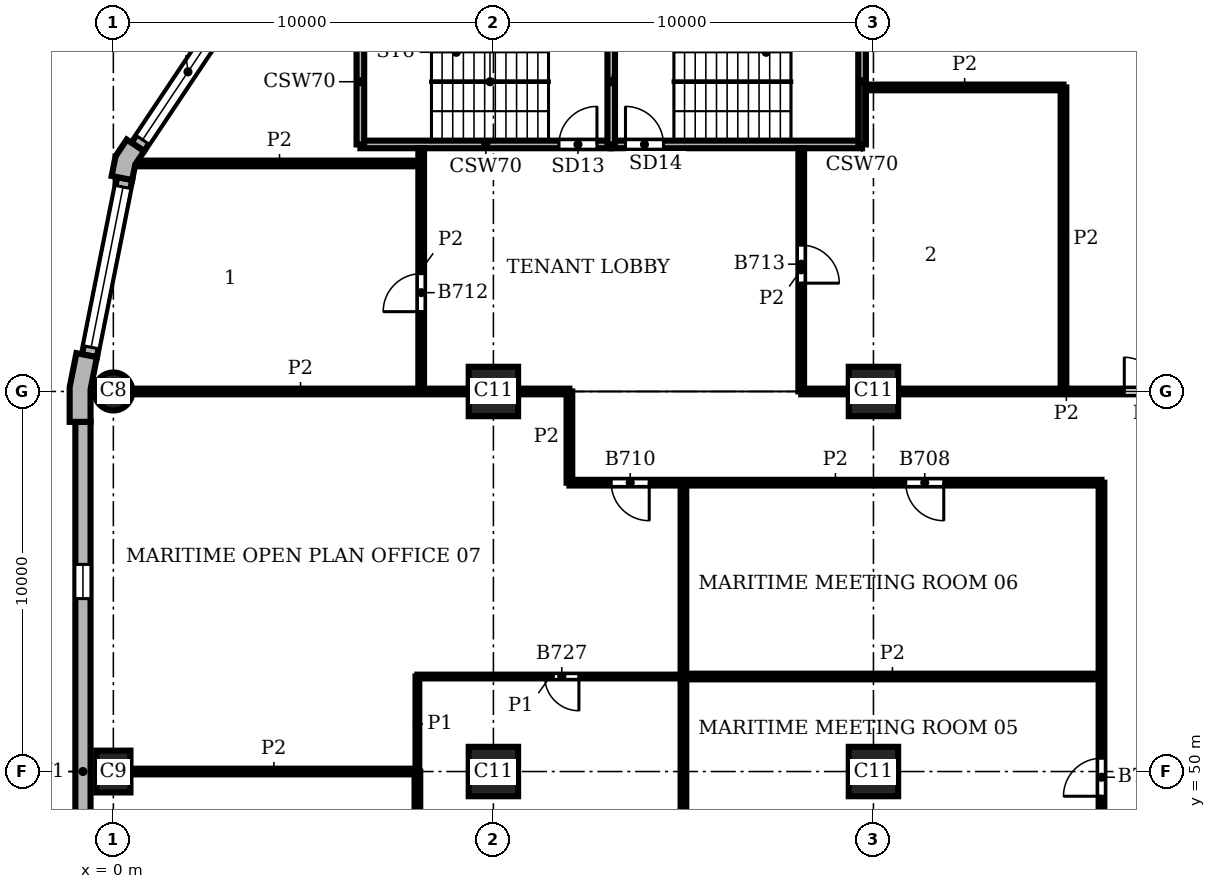
"""IFC4 building model, lengths in metres.
Left out: names, types, materials, properties, quantities, classifications, styles, units other than length and angle.
Written with IfcOpenShell. Run it as: python <this file> out.ifc"""

import sys

from ifc_helpers import new_model, si_unit, direction, frame, frame_2d, origin, origin_2d, place, context, subcontext, project, spatial, polyline, rectangle, circle, outline, extrude, element, fill, save


model = new_model("IFC4")
c1 = context("Model", 3, precision=1e-05, world=origin(), true_north=direction((0.0, 1.0)))
c2 = subcontext(c1, "Body", "Model", "MODEL_VIEW")
j1 = project(units=[si_unit("LENGTHUNIT", "METRE"), si_unit("PLANEANGLEUNIT", "RADIAN")], contexts=[c1])
p1 = place(None, origin())
s1 = spatial("IfcSite", under=j1, at=p1, CompositionType="ELEMENT")
p2 = place(p1, origin())
s2 = spatial("IfcBuilding", under=s1, at=p2, CompositionType="ELEMENT")
p3 = place(p2, frame((0.0, 0.0, 209.7)))
s3 = spatial("IfcBuildingStorey", under=s2, at=p3, CompositionType="ELEMENT", Elevation=209.7)
p4 = place(p3, frame((0.0, 60.0, 0.0), z_axis=(0.0, 0.0, 1.0), x_axis=(1.0, 0.0, 0.0)))
e1 = element("IfcColumn", 1, at=p4, inside=s3, PredefinedType="COLUMN", context=c2, shape_type="SweptSolid", body=[
    extrude(circle(Radius=0.5, at=origin_2d()), origin(), (0.0, 0.0, 1.0), 3.9),
])
p5 = place(p3, frame((0.0, 50.0, 0.0), z_axis=(0.0, 0.0, 1.0), x_axis=(0.0, 1.0, 0.0)))
e2 = element("IfcColumn", 2, at=p5, inside=s3, PredefinedType="COLUMN", context=c2, shape_type="SweptSolid", body=[
    extrude(rectangle(XDim=1.1, YDim=0.9, at=origin_2d()), origin(), (0.0, 0.0, 1.0), 3.9),
])
for number, where, z_axis, x_axis in (
    (3, (10.0, 50.0, 0.0), (0.0, 0.0, 1.0), (1.0, 0.0, 0.0)),
    (4, (10.0, 60.0, 0.0), (0.0, 0.0, 1.0), (1.0, 0.0, 0.0)),
    (5, (20.0, 50.0, 0.0), (0.0, 0.0, 1.0), (1.0, 0.0, 0.0)),
    (6, (20.0, 60.0, 0.0), (0.0, 0.0, 1.0), (1.0, 0.0, 0.0)),
):
    element("IfcColumn", number, at=place(p3, frame(where, z_axis=z_axis, x_axis=x_axis)), inside=s3, PredefinedType="COLUMN", context=c2, shape_type="SweptSolid", body=[
        extrude(rectangle(XDim=1.3, YDim=1.3, at=origin_2d()), origin(), (0.0, 0.0, 1.0), 3.9),
    ])
p6 = place(p3, origin())
e7 = element("IfcWall", 7, at=p6, inside=s3, PredefinedType="SOLIDWALL", context=c2, shape_type="SweptSolid", body=[
    extrude(outline(polyline([(0.477, 66.545), (0.352, 66.629), (0.059, 66.189), (-0.045, 65.67), (0.103, 65.641), (0.495, 65.563), (0.577, 65.974), (0.81, 66.323), (0.477, 66.545)])), origin(), (0.0, 0.0, 1.0), 3.9),
])
e8 = element("IfcWall", 8, at=p6, inside=s3, PredefinedType="SOLIDWALL", context=c2, shape_type="SweptSolid", body=[
    extrude(outline(polyline([(-0.825, 60.98), (-0.972, 61.009), (-1.15, 60.113), (-1.15, 59.2), (-1.0, 59.2), (-0.6, 59.2), (-0.6, 60.059), (-0.432, 60.902), (-0.825, 60.98)])), origin(), (0.0, 0.0, 1.0), 3.9),
])
p7 = place(p3, frame((29.357, 66.434, 0.0), z_axis=(0.0, 0.0, 1.0), x_axis=(-0.555541552266, 0.831488775454, 0.0)))
e9 = element("IfcWall", 9, at=p7, inside=s3, PredefinedType="SOLIDWALL", context=c2, shape_type="SweptSolid", body=[
    extrude(rectangle(XDim=4.753, YDim=0.4, at=frame_2d((2.376, 0.0))), origin(), (0.0, 0.0, 1.0), 3.9),
])
p8 = place(p7, frame((0.226, 0.0, 0.9)))
e10 = element("IfcOpeningElement", 10, at=p8, cuts=e9, PredefinedType="OPENING", context=c2, shape_type="SweptSolid", body=[
    extrude(rectangle(XDim=4.3, YDim=2.35, at=frame_2d((2.15, 1.175))), frame((0.0, 0.21, 0.0), z_axis=(0.0, -1.0, 0.0), x_axis=(1.0, 0.0, 0.0)), (0.0, 0.0, 1.0), 0.42),
])
p9 = place(p3, frame((3.284, 70.386, 0.0), z_axis=(0.0, 0.0, 1.0), x_axis=(-0.555541552266, -0.831488775454, 0.0)))
e11 = element("IfcWall", 11, at=p9, inside=s3, PredefinedType="SOLIDWALL", context=c2, shape_type="SweptSolid", body=[
    extrude(rectangle(XDim=4.753, YDim=0.4, at=frame_2d((2.376, 0.0))), origin(), (0.0, 0.0, 1.0), 3.9),
])
p10 = place(p9, frame((0.226, 0.0, 0.9)))
e12 = element("IfcOpeningElement", 12, at=p10, cuts=e11, PredefinedType="OPENING", context=c2, shape_type="SweptSolid", body=[
    extrude(rectangle(XDim=4.3, YDim=2.35, at=frame_2d((2.15, 1.175))), frame((0.0, 0.21, 0.0), z_axis=(0.0, -1.0, 0.0), x_axis=(1.0, 0.0, 0.0)), (0.0, 0.0, 1.0), 0.42),
])
p11 = place(p3, frame((0.299, 65.602, 0.0), z_axis=(0.0, 0.0, 1.0), x_axis=(-0.195098533057, -0.98078364709, 0.0)))
e13 = element("IfcWall", 13, at=p11, inside=s3, PredefinedType="SOLIDWALL", context=c2, shape_type="SweptSolid", body=[
    extrude(rectangle(XDim=4.753, YDim=0.4, at=frame_2d((2.376, 0.0))), origin(), (0.0, 0.0, 1.0), 3.9),
])
p12 = place(p11, frame((0.226, 0.0, 0.9)))
e14 = element("IfcOpeningElement", 14, at=p12, cuts=e13, PredefinedType="OPENING", context=c2, shape_type="SweptSolid", body=[
    extrude(rectangle(XDim=4.3, YDim=2.35, at=frame_2d((2.15, 1.175))), frame((0.0, 0.21, 0.0), z_axis=(0.0, -1.0, 0.0), x_axis=(1.0, 0.0, 0.0)), (0.0, 0.0, 1.0), 0.42),
])
p13 = place(p3, frame((-0.8, 59.2, 0.0), z_axis=(0.0, 0.0, 1.0), x_axis=(0.0, -1.0, 0.0)))
e15 = element("IfcWall", 15, at=p13, inside=s3, PredefinedType="SOLIDWALL", context=c2, shape_type="SweptSolid", body=[
    extrude(rectangle(XDim=18.4, YDim=0.4, at=frame_2d((9.2, 0.0))), origin(), (0.0, 0.0, 1.0), 3.9),
])
p14 = place(p13, frame((3.75, 0.0, 0.9)))
e16 = element("IfcOpeningElement", 16, at=p14, cuts=e15, PredefinedType="OPENING", context=c2, shape_type="SweptSolid", body=[
    extrude(rectangle(XDim=0.9, YDim=2.35, at=frame_2d((0.45, 1.175))), frame((0.0, 0.21, 0.0), z_axis=(0.0, -1.0, 0.0), x_axis=(1.0, 0.0, 0.0)), (0.0, 0.0, 1.0), 0.42),
])
p15 = place(p13, frame((13.75, 0.0, 0.9)))
e17 = element("IfcOpeningElement", 17, at=p15, cuts=e15, PredefinedType="OPENING", context=c2, shape_type="SweptSolid", body=[
    extrude(rectangle(XDim=0.9, YDim=2.35, at=frame_2d((0.45, 1.175))), frame((0.0, 0.21, 0.0), z_axis=(0.0, -1.0, 0.0), x_axis=(1.0, 0.0, 0.0)), (0.0, 0.0, 1.0), 0.42),
])
p16 = place(p3, frame((6.5, 66.5, 0.0), z_axis=(0.0, 0.0, 1.0), x_axis=(1.0, 0.0, 0.0)))
e18 = element("IfcWall", 18, at=p16, inside=s3, PredefinedType="SHEAR", context=c2, shape_type="SweptSolid", body=[
    extrude(rectangle(XDim=6.6, YDim=0.2, at=frame_2d((3.3, 0.0))), origin(), (0.0, 0.0, 1.0), 3.58),
])
p17 = place(p16, frame((5.225, 0.0, 0.0)))
e19 = element("IfcOpeningElement", 19, at=p17, cuts=e18, PredefinedType="OPENING", context=c2, shape_type="SweptSolid", body=[
    extrude(rectangle(XDim=1.0, YDim=2.1, at=frame_2d((0.5, 1.05))), frame((0.0, 0.11, 0.0), z_axis=(0.0, -1.0, 0.0), x_axis=(1.0, 0.0, 0.0)), (0.0, 0.0, 1.0), 0.22),
])
p18 = place(p3, frame((13.1, 66.5, 0.0), z_axis=(0.0, 0.0, 1.0), x_axis=(1.0, 0.0, 0.0)))
e20 = element("IfcWall", 20, at=p18, inside=s3, PredefinedType="SHEAR", context=c2, shape_type="SweptSolid", body=[
    extrude(rectangle(XDim=6.6, YDim=0.2, at=frame_2d((3.3, 0.0))), origin(), (0.0, 0.0, 1.0), 3.58),
])
p19 = place(p18, frame((0.375, 0.0, 0.0)))
e21 = element("IfcOpeningElement", 21, at=p19, cuts=e20, PredefinedType="OPENING", context=c2, shape_type="SweptSolid", body=[
    extrude(rectangle(XDim=1.0, YDim=2.1, at=frame_2d((0.5, 1.05))), frame((0.0, 0.11, 0.0), z_axis=(0.0, -1.0, 0.0), x_axis=(1.0, 0.0, 0.0)), (0.0, 0.0, 1.0), 0.22),
])
for number, where, z_axis, x_axis in (
    (22, (6.5, 66.5, 0.0), (0.0, 0.0, 1.0), (0.0, 1.0, 0.0)),
    (23, (13.1, 66.5, 0.0), (0.0, 0.0, 1.0), (0.0, 1.0, 0.0)),
    (24, (19.7, 66.5, 0.0), (0.0, 0.0, 1.0), (0.0, 1.0, 0.0)),
):
    element("IfcWall", number, at=place(p3, frame(where, z_axis=z_axis, x_axis=x_axis)), inside=s3, PredefinedType="SHEAR", context=c2, shape_type="SweptSolid", body=[
        extrude(rectangle(XDim=3.3, YDim=0.2, at=frame_2d((1.65, 0.0))), origin(), (0.0, 0.0, 1.0), 3.58),
    ])
p20 = place(p3, frame((8.0, 50.0, 0.0), z_axis=(0.0, 0.0, 1.0), x_axis=(0.0, 1.0, 0.0)))
e25 = element("IfcWall", 25, at=p20, inside=s3, PredefinedType="PARTITIONING", context=c2, shape_type="SweptSolid", body=[
    extrude(rectangle(XDim=2.5, YDim=0.1, at=frame_2d((1.25, 0.0))), origin(), (0.0, 0.0, 1.0), 3.58),
])
p21 = place(p3, frame((8.0, 52.5, 0.0), z_axis=(0.0, 0.0, 1.0), x_axis=(1.0, 0.0, 0.0)))
e26 = element("IfcWall", 26, at=p21, inside=s3, PredefinedType="PARTITIONING", context=c2, shape_type="SweptSolid", body=[
    extrude(rectangle(XDim=7.0, YDim=0.1, at=frame_2d((3.5, 0.0))), origin(), (0.0, 0.0, 1.0), 3.58),
])
p22 = place(p21, frame((3.35, 0.0, 0.0)))
e27 = element("IfcOpeningElement", 27, at=p22, cuts=e26, PredefinedType="OPENING", context=c2, shape_type="SweptSolid", body=[
    extrude(rectangle(XDim=0.9, YDim=2.1, at=frame_2d((0.45, 1.05))), frame((0.0, 0.06, 0.0), z_axis=(0.0, -1.0, 0.0), x_axis=(1.0, 0.0, 0.0)), (0.0, 0.0, 1.0), 0.12),
])
p23 = place(p3, frame((8.0, 40.0, 0.0), z_axis=(0.0, 0.0, 1.0), x_axis=(0.0, 1.0, 0.0)))
e28 = element("IfcWall", 28, at=p23, inside=s3, PredefinedType="PARTITIONING", context=c2, shape_type="SweptSolid", body=[
    extrude(rectangle(XDim=10.0, YDim=0.15, at=frame_2d((5.0, 0.0))), origin(), (0.0, 0.0, 1.0), 3.58),
])
p24 = place(p3, frame((8.1, 60.0, 0.0), z_axis=(0.0, 0.0, 1.0), x_axis=(0.0, 1.0, 0.0)))
e29 = element("IfcWall", 29, at=p24, inside=s3, PredefinedType="PARTITIONING", context=c2, shape_type="SweptSolid", body=[
    extrude(rectangle(XDim=6.4, YDim=0.15, at=frame_2d((3.2, 0.0))), origin(), (0.0, 0.0, 1.0), 3.58),
])
p25 = place(p24, frame((2.1, 0.0, 0.0)))
e30 = element("IfcOpeningElement", 30, at=p25, cuts=e29, PredefinedType="OPENING", context=c2, shape_type="SweptSolid", body=[
    extrude(rectangle(XDim=1.0, YDim=2.1, at=frame_2d((0.5, 1.05))), frame((0.0, 0.085, 0.0), z_axis=(0.0, -1.0, 0.0), x_axis=(1.0, 0.0, 0.0)), (0.0, 0.0, 1.0), 0.17),
])
p26 = place(p3, frame((12.0, 57.6, 0.0), z_axis=(0.0, 0.0, 1.0), x_axis=(0.0, 1.0, 0.0)))
e31 = element("IfcWall", 31, at=p26, inside=s3, PredefinedType="PARTITIONING", context=c2, shape_type="SweptSolid", body=[
    extrude(rectangle(XDim=2.4, YDim=0.15, at=frame_2d((1.2, 0.0))), origin(), (0.0, 0.0, 1.0), 3.58),
])
p27 = place(p3, frame((15.0, 28.0, 0.0), z_axis=(0.0, 0.0, 1.0), x_axis=(0.0, 1.0, 0.0)))
e32 = element("IfcWall", 32, at=p27, inside=s3, PredefinedType="PARTITIONING", context=c2, shape_type="SweptSolid", body=[
    extrude(rectangle(XDim=29.6, YDim=0.15, at=frame_2d((14.8, 0.0))), origin(), (0.0, 0.0, 1.0), 3.58),
])
p28 = place(p3, frame((18.1, 60.0, 0.0), z_axis=(0.0, 0.0, 1.0), x_axis=(0.0, 1.0, 0.0)))
e33 = element("IfcWall", 33, at=p28, inside=s3, PredefinedType="PARTITIONING", context=c2, shape_type="SweptSolid", body=[
    extrude(rectangle(XDim=6.4, YDim=0.15, at=frame_2d((3.2, 0.0))), origin(), (0.0, 0.0, 1.0), 3.58),
])
p29 = place(p28, frame((2.85, 0.0, 0.0)))
e34 = element("IfcOpeningElement", 34, at=p29, cuts=e33, PredefinedType="OPENING", context=c2, shape_type="SweptSolid", body=[
    extrude(rectangle(XDim=1.0, YDim=2.1, at=frame_2d((0.5, 1.05))), frame((0.0, 0.085, 0.0), z_axis=(0.0, -1.0, 0.0), x_axis=(1.0, 0.0, 0.0)), (0.0, 0.0, 1.0), 0.17),
])
p30 = place(p3, frame((25.0, 60.0, 0.0), z_axis=(0.0, 0.0, 1.0), x_axis=(0.0, 1.0, 0.0)))
e35 = element("IfcWall", 35, at=p30, inside=s3, PredefinedType="PARTITIONING", context=c2, shape_type="SweptSolid", body=[
    extrude(rectangle(XDim=8.0, YDim=0.15, at=frame_2d((4.0, 0.0))), origin(), (0.0, 0.0, 1.0), 3.58),
])
p31 = place(p3, frame((26.0, 28.0, 0.0), z_axis=(0.0, 0.0, 1.0), x_axis=(0.0, 1.0, 0.0)))
e36 = element("IfcWall", 36, at=p31, inside=s3, PredefinedType="PARTITIONING", context=c2, shape_type="SweptSolid", body=[
    extrude(rectangle(XDim=29.6, YDim=0.15, at=frame_2d((14.8, 0.0))), origin(), (0.0, 0.0, 1.0), 3.58),
])
p32 = place(p31, frame((3.6, 0.0, 0.0)))
e37 = element("IfcOpeningElement", 37, at=p32, cuts=e36, PredefinedType="OPENING", context=c2, shape_type="SweptSolid", body=[
    extrude(rectangle(XDim=1.0, YDim=2.1, at=frame_2d((0.5, 1.05))), frame((0.0, 0.085, 0.0), z_axis=(0.0, -1.0, 0.0), x_axis=(1.0, 0.0, 0.0)), (0.0, 0.0, 1.0), 0.17),
])
p33 = place(p31, frame((11.85, 0.0, 0.0)))
e38 = element("IfcOpeningElement", 38, at=p33, cuts=e36, PredefinedType="OPENING", context=c2, shape_type="SweptSolid", body=[
    extrude(rectangle(XDim=1.0, YDim=2.1, at=frame_2d((0.5, 1.05))), frame((0.0, 0.085, 0.0), z_axis=(0.0, -1.0, 0.0), x_axis=(1.0, 0.0, 0.0)), (0.0, 0.0, 1.0), 0.17),
])
p34 = place(p31, frame((21.35, 0.0, 0.0)))
e39 = element("IfcOpeningElement", 39, at=p34, cuts=e36, PredefinedType="OPENING", context=c2, shape_type="SweptSolid", body=[
    extrude(rectangle(XDim=1.0, YDim=2.1, at=frame_2d((0.5, 1.05))), frame((0.0, 0.085, 0.0), z_axis=(0.0, -1.0, 0.0), x_axis=(1.0, 0.0, 0.0)), (0.0, 0.0, 1.0), 0.17),
])
p35 = place(p3, frame((0.45, 50.0, 0.0), z_axis=(0.0, 0.0, 1.0), x_axis=(1.0, 0.0, 0.0)))
e40 = element("IfcWall", 40, at=p35, inside=s3, PredefinedType="PARTITIONING", context=c2, shape_type="SweptSolid", body=[
    extrude(rectangle(XDim=7.55, YDim=0.15, at=frame_2d((3.775, 0.0))), origin(), (0.0, 0.0, 1.0), 3.58),
])
p36 = place(p3, frame((15.0, 52.5, 0.0), z_axis=(0.0, 0.0, 1.0), x_axis=(1.0, 0.0, 0.0)))
e41 = element("IfcWall", 41, at=p36, inside=s3, PredefinedType="PARTITIONING", context=c2, shape_type="SweptSolid", body=[
    extrude(rectangle(XDim=11.0, YDim=0.15, at=frame_2d((5.5, 0.0))), origin(), (0.0, 0.0, 1.0), 3.58),
])
p37 = place(p3, frame((12.0, 57.6, 0.0), z_axis=(0.0, 0.0, 1.0), x_axis=(1.0, 0.0, 0.0)))
e42 = element("IfcWall", 42, at=p37, inside=s3, PredefinedType="PARTITIONING", context=c2, shape_type="SweptSolid", body=[
    extrude(rectangle(XDim=14.0, YDim=0.15, at=frame_2d((7.0, 0.0))), origin(), (0.0, 0.0, 1.0), 3.58),
])
p38 = place(p37, frame((8.85, 0.0, 0.0)))
e43 = element("IfcOpeningElement", 43, at=p38, cuts=e42, PredefinedType="OPENING", context=c2, shape_type="SweptSolid", body=[
    extrude(rectangle(XDim=1.0, YDim=2.1, at=frame_2d((0.5, 1.05))), frame((0.0, 0.085, 0.0), z_axis=(0.0, -1.0, 0.0), x_axis=(1.0, 0.0, 0.0)), (0.0, 0.0, 1.0), 0.17),
])
p39 = place(p37, frame((1.1, 0.0, 0.0)))
e44 = element("IfcOpeningElement", 44, at=p39, cuts=e42, PredefinedType="OPENING", context=c2, shape_type="SweptSolid", body=[
    extrude(rectangle(XDim=1.0, YDim=2.1, at=frame_2d((0.5, 1.05))), frame((0.0, 0.085, 0.0), z_axis=(0.0, -1.0, 0.0), x_axis=(1.0, 0.0, 0.0)), (0.0, 0.0, 1.0), 0.17),
])
p40 = place(p3, frame((0.5, 60.0, 0.0), z_axis=(0.0, 0.0, 1.0), x_axis=(1.0, 0.0, 0.0)))
e45 = element("IfcWall", 45, at=p40, inside=s3, PredefinedType="PARTITIONING", context=c2, shape_type="SweptSolid", body=[
    extrude(rectangle(XDim=8.85, YDim=0.15, at=frame_2d((4.425, 0.0))), origin(), (0.0, 0.0, 1.0), 3.58),
])
p41 = place(p3, frame((10.65, 60.0, 0.0), z_axis=(0.0, 0.0, 1.0), x_axis=(1.0, 0.0, 0.0)))
e46 = element("IfcWall", 46, at=p41, inside=s3, PredefinedType="PARTITIONING", context=c2, shape_type="SweptSolid", body=[
    extrude(rectangle(XDim=1.35, YDim=0.15, at=frame_2d((0.675, 0.0))), origin(), (0.0, 0.0, 1.0), 3.58),
])
p42 = place(p3, frame((18.1, 60.0, 0.0), z_axis=(0.0, 0.0, 1.0), x_axis=(1.0, 0.0, 0.0)))
e47 = element("IfcWall", 47, at=p42, inside=s3, PredefinedType="PARTITIONING", context=c2, shape_type="SweptSolid", body=[
    extrude(rectangle(XDim=1.25, YDim=0.15, at=frame_2d((0.625, 0.0))), origin(), (0.0, 0.0, 1.0), 3.58),
])
p43 = place(p3, frame((20.65, 60.0, 0.0), z_axis=(0.0, 0.0, 1.0), x_axis=(1.0, 0.0, 0.0)))
e48 = element("IfcWall", 48, at=p43, inside=s3, PredefinedType="PARTITIONING", context=c2, shape_type="SweptSolid", body=[
    extrude(rectangle(XDim=8.85, YDim=0.15, at=frame_2d((4.425, 0.0))), origin(), (0.0, 0.0, 1.0), 3.58),
])
p44 = place(p43, frame((5.95, 0.0, 0.0)))
e49 = element("IfcOpeningElement", 49, at=p44, cuts=e48, PredefinedType="OPENING", context=c2, shape_type="SweptSolid", body=[
    extrude(rectangle(XDim=1.8, YDim=2.1, at=frame_2d((0.9, 1.05))), frame((0.0, 0.085, 0.0), z_axis=(0.0, -1.0, 0.0), x_axis=(1.0, 0.0, 0.0)), (0.0, 0.0, 1.0), 0.17),
])
p45 = place(p3, frame((0.644, 66.0, 0.0), z_axis=(0.0, 0.0, 1.0), x_axis=(1.0, 0.0, 0.0)))
e50 = element("IfcWall", 50, at=p45, inside=s3, PredefinedType="PARTITIONING", context=c2, shape_type="SweptSolid", body=[
    extrude(rectangle(XDim=7.456, YDim=0.15, at=frame_2d((3.728, 0.0))), origin(), (0.0, 0.0, 1.0), 3.58),
])
p46 = place(p3, frame((19.8, 68.0, 0.0), z_axis=(0.0, 0.0, 1.0), x_axis=(1.0, 0.0, 0.0)))
e51 = element("IfcWall", 51, at=p46, inside=s3, PredefinedType="PARTITIONING", context=c2, shape_type="SweptSolid", body=[
    extrude(rectangle(XDim=5.2, YDim=0.15, at=frame_2d((2.6, 0.0))), origin(), (0.0, 0.0, 1.0), 3.58),
])
p47 = place(p8, origin())
e52 = element("IfcWindow", 52, at=p47, inside=s3, PartitioningType="SINGLE_PANEL", PredefinedType="WINDOW", context=c2, shape_type="SweptSolid", body=[
    extrude(rectangle(XDim=4.3, YDim=2.35, at=frame_2d((2.15, 1.175))), frame((0.0, 0.16, 0.0), z_axis=(0.0, -1.0, 0.0), x_axis=(1.0, 0.0, 0.0)), (0.0, 0.0, 1.0), 0.06),
])
fill(e10, e52)
p48 = place(p10, origin())
e53 = element("IfcWindow", 53, at=p48, inside=s3, PartitioningType="SINGLE_PANEL", PredefinedType="WINDOW", context=c2, shape_type="SweptSolid", body=[
    extrude(rectangle(XDim=4.3, YDim=2.35, at=frame_2d((2.15, 1.175))), frame((0.0, 0.16, 0.0), z_axis=(0.0, -1.0, 0.0), x_axis=(1.0, 0.0, 0.0)), (0.0, 0.0, 1.0), 0.06),
])
fill(e12, e53)
p49 = place(p12, origin())
e54 = element("IfcWindow", 54, at=p49, inside=s3, PartitioningType="SINGLE_PANEL", PredefinedType="WINDOW", context=c2, shape_type="SweptSolid", body=[
    extrude(rectangle(XDim=4.3, YDim=2.35, at=frame_2d((2.15, 1.175))), frame((0.0, 0.16, 0.0), z_axis=(0.0, -1.0, 0.0), x_axis=(1.0, 0.0, 0.0)), (0.0, 0.0, 1.0), 0.06),
])
fill(e14, e54)
p50 = place(p14, origin())
e55 = element("IfcWindow", 55, at=p50, inside=s3, PartitioningType="SINGLE_PANEL", PredefinedType="WINDOW", context=c2, shape_type="SweptSolid", body=[
    extrude(rectangle(XDim=0.9, YDim=2.35, at=frame_2d((0.45, 1.175))), frame((0.0, 0.16, 0.0), z_axis=(0.0, -1.0, 0.0), x_axis=(1.0, 0.0, 0.0)), (0.0, 0.0, 1.0), 0.06),
])
fill(e16, e55)
p51 = place(p17, origin())
e56 = element("IfcDoor", 56, at=p51, inside=s3, OperationType="SINGLE_SWING_RIGHT", PredefinedType="DOOR", context=c2, shape_type="SweptSolid", body=[
    extrude(rectangle(XDim=1.0, YDim=2.1, at=frame_2d((0.5, 1.05))), frame((0.0, 0.025, 0.0), z_axis=(0.0, -1.0, 0.0), x_axis=(1.0, 0.0, 0.0)), (0.0, 0.0, 1.0), 0.05),
])
fill(e19, e56)
p52 = place(p19, origin())
e57 = element("IfcDoor", 57, at=p52, inside=s3, OperationType="SINGLE_SWING_LEFT", PredefinedType="DOOR", context=c2, shape_type="SweptSolid", body=[
    extrude(rectangle(XDim=1.0, YDim=2.1, at=frame_2d((0.5, 1.05))), frame((0.0, 0.025, 0.0), z_axis=(0.0, -1.0, 0.0), x_axis=(1.0, 0.0, 0.0)), (0.0, 0.0, 1.0), 0.05),
])
fill(e21, e57)
p53 = place(p34, origin())
e58 = element("IfcDoor", 58, at=p53, inside=s3, OperationType="SINGLE_SWING_LEFT", PredefinedType="DOOR", context=c2, shape_type="SweptSolid", body=[
    extrude(rectangle(XDim=1.0, YDim=2.1, at=frame_2d((0.5, 1.05))), frame((0.0, 0.025, 0.0), z_axis=(0.0, -1.0, 0.0), x_axis=(1.0, 0.0, 0.0)), (0.0, 0.0, 1.0), 0.05),
])
fill(e39, e58)
p54 = place(p38, frame((1.0, 0.0, 0.0), z_axis=(0.0, 0.0, 1.0), x_axis=(-1.0, 0.0, 0.0)))
e59 = element("IfcDoor", 59, at=p54, inside=s3, OperationType="SINGLE_SWING_LEFT", PredefinedType="DOOR", context=c2, shape_type="SweptSolid", body=[
    extrude(rectangle(XDim=1.0, YDim=2.1, at=frame_2d((0.5, 1.05))), frame((0.0, 0.025, 0.0), z_axis=(0.0, -1.0, 0.0), x_axis=(1.0, 0.0, 0.0)), (0.0, 0.0, 1.0), 0.05),
])
fill(e43, e59)
p55 = place(p39, frame((1.0, 0.0, 0.0), z_axis=(0.0, 0.0, 1.0), x_axis=(-1.0, 0.0, 0.0)))
e60 = element("IfcDoor", 60, at=p55, inside=s3, OperationType="SINGLE_SWING_LEFT", PredefinedType="DOOR", context=c2, shape_type="SweptSolid", body=[
    extrude(rectangle(XDim=1.0, YDim=2.1, at=frame_2d((0.5, 1.05))), frame((0.0, 0.025, 0.0), z_axis=(0.0, -1.0, 0.0), x_axis=(1.0, 0.0, 0.0)), (0.0, 0.0, 1.0), 0.05),
])
fill(e44, e60)
p56 = place(p25, origin())
e61 = element("IfcDoor", 61, at=p56, inside=s3, OperationType="SINGLE_SWING_LEFT", PredefinedType="DOOR", context=c2, shape_type="SweptSolid", body=[
    extrude(rectangle(XDim=1.0, YDim=2.1, at=frame_2d((0.5, 1.05))), frame((0.0, 0.025, 0.0), z_axis=(0.0, -1.0, 0.0), x_axis=(1.0, 0.0, 0.0)), (0.0, 0.0, 1.0), 0.05),
])
fill(e30, e61)
p57 = place(p29, frame((1.0, 0.0, 0.0), z_axis=(0.0, 0.0, 1.0), x_axis=(-1.0, 0.0, 0.0)))
e62 = element("IfcDoor", 62, at=p57, inside=s3, OperationType="SINGLE_SWING_RIGHT", PredefinedType="DOOR", context=c2, shape_type="SweptSolid", body=[
    extrude(rectangle(XDim=1.0, YDim=2.1, at=frame_2d((0.5, 1.05))), frame((0.0, 0.025, 0.0), z_axis=(0.0, -1.0, 0.0), x_axis=(1.0, 0.0, 0.0)), (0.0, 0.0, 1.0), 0.05),
])
fill(e34, e62)
p58 = place(p44, origin())
e63 = element("IfcDoor", 63, at=p58, inside=s3, OperationType="DOUBLE_DOOR_SINGLE_SWING", PredefinedType="DOOR", context=c2, shape_type="SweptSolid", body=[
    extrude(rectangle(XDim=1.8, YDim=2.1, at=frame_2d((0.9, 1.05))), frame((0.0, 0.025, 0.0), z_axis=(0.0, -1.0, 0.0), x_axis=(1.0, 0.0, 0.0)), (0.0, 0.0, 1.0), 0.05),
])
fill(e49, e63)
p59 = place(p22, frame((0.9, 0.0, 0.0), z_axis=(0.0, 0.0, 1.0), x_axis=(-1.0, 0.0, 0.0)))
e64 = element("IfcDoor", 64, at=p59, inside=s3, OperationType="SINGLE_SWING_LEFT", PredefinedType="DOOR", context=c2, shape_type="SweptSolid", body=[
    extrude(rectangle(XDim=0.9, YDim=2.1, at=frame_2d((0.45, 1.05))), frame((0.0, 0.025, 0.0), z_axis=(0.0, -1.0, 0.0), x_axis=(1.0, 0.0, 0.0)), (0.0, 0.0, 1.0), 0.05),
])
fill(e27, e64)
save(model, sys.argv[1])
